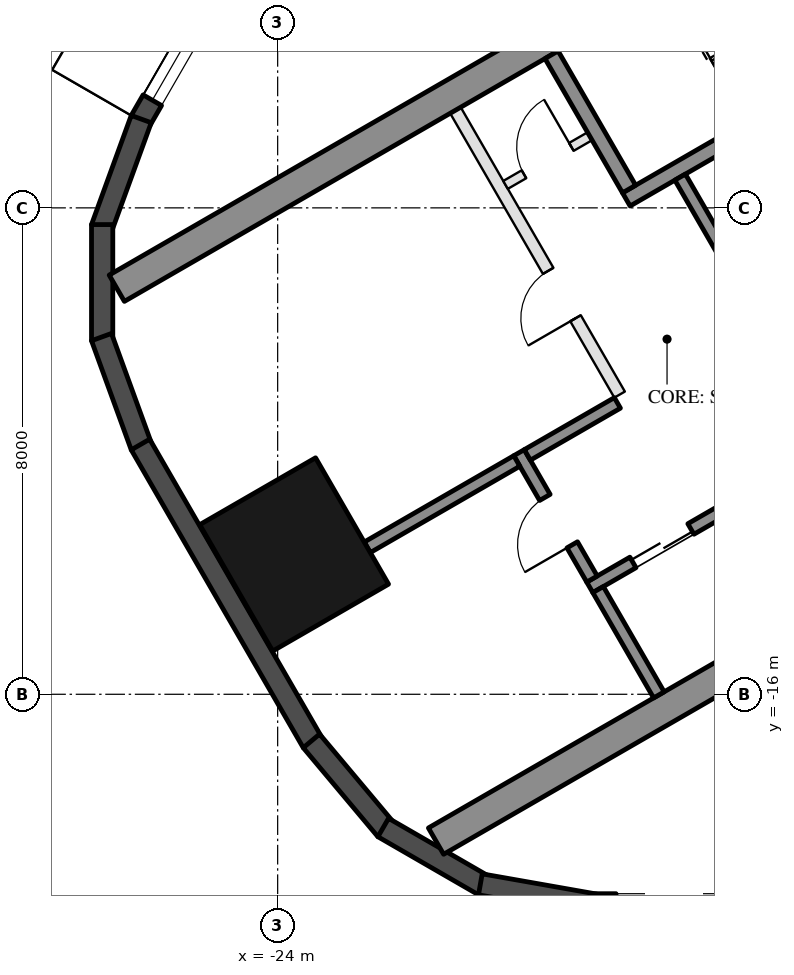
"""IFC4 building model, lengths in metres.
Left out: names, types, materials, properties, quantities, classifications, styles, units other than length and angle.
Written with IfcOpenShell. Run it as: python <this file> out.ifc"""

import sys

from ifc_helpers import new_model, si_unit, direction, frame, frame_2d, origin, origin_2d, place, context, subcontext, project, spatial, rectangle, hollow_rectangle, extrude, element, fill, save


model = new_model("IFC4")
c1 = context("Model", 3, precision=1e-05, world=origin(), true_north=direction((0.0, 1.0)))
c2 = subcontext(c1, "Body", "Model", "MODEL_VIEW")
j1 = project(units=[si_unit("LENGTHUNIT", "METRE"), si_unit("PLANEANGLEUNIT", "RADIAN")], contexts=[c1])
p1 = place(None, origin())
s1 = spatial("IfcSite", under=j1, at=p1, CompositionType="ELEMENT")
p2 = place(p1, origin())
s2 = spatial("IfcBuilding", under=s1, at=p2, CompositionType="ELEMENT")
p3 = place(p2, frame((0.0, 0.0, 228.0)))
s3 = spatial("IfcBuildingStorey", under=s2, at=p3, CompositionType="ELEMENT", Elevation=228.0)
p4 = place(p3, frame((-23.729, -13.7, 0.0), z_axis=(0.0, 0.0, 1.0), x_axis=(-0.5, 0.866025403784, 0.0)))
e1 = element("IfcColumn", 1, at=p4, inside=s3, PredefinedType="COLUMN", context=c2, shape_type="SweptSolid", body=[
    extrude(hollow_rectangle(XDim=2.4, YDim=2.2, WallThickness=0.06, at=origin_2d()), origin(), (0.0, 0.0, 1.0), 3.7),
])
p5 = place(p3, frame((-24.299, -3.176, 0.0), z_axis=(0.0, 0.0, 1.0), x_axis=(-0.500028278809, -0.866009076391, 0.0)))
e2 = element("IfcWall", 2, at=p5, inside=s3, PredefinedType="SOLIDWALL", context=c2, shape_type="SweptSolid", body=[
    extrude(rectangle(XDim=3.916, YDim=0.35, at=frame_2d((1.958, 0.0))), origin(), (0.0, 0.0, 1.0), 3.45),
])
p6 = place(p5, frame((1.625, 0.0, 0.3)))
e3 = element("IfcOpeningElement", 3, at=p6, cuts=e2, PredefinedType="OPENING", context=c2, shape_type="SweptSolid", body=[
    extrude(rectangle(XDim=1.9, YDim=2.65, at=frame_2d((0.95, 1.325))), frame((0.0, 0.185, 0.0), z_axis=(0.0, -1.0, 0.0), x_axis=(1.0, 0.0, 0.0)), (0.0, 0.0, 1.0), 0.37),
])
for number, where, z_axis, x_axis in (
    (4, (-26.244, -6.54, 0.0), (0.0, 0.0, 1.0), (-0.342, -0.94, 0.0)),
    (5, (-26.886, -8.275, 0.0), (0.0, 0.0, 1.0), (0.0, -1.0, 0.0)),
    (6, (-26.897, -10.125, 0.0), (0.0, 0.0, 1.0), (0.342, -0.94, 0.0)),
):
    element("IfcWall", number, at=place(p3, frame(where, z_axis=z_axis, x_axis=x_axis)), inside=s3, PredefinedType="SOLIDWALL", context=c2, shape_type="SweptSolid", body=[
        extrude(rectangle(XDim=1.91, YDim=0.35, at=frame_2d((0.955, 0.0))), origin(), (0.0, 0.0, 1.0), 3.45),
    ])
p7 = place(p3, frame((-26.257, -11.893, 0.0), z_axis=(0.0, 0.0, 1.0), x_axis=(0.500018773155, -0.866014564827, 0.0)))
e7 = element("IfcWall", 7, at=p7, inside=s3, PredefinedType="SOLIDWALL", context=c2, shape_type="SweptSolid", body=[
    extrude(rectangle(XDim=5.658, YDim=0.35, at=frame_2d((2.829, 0.0))), origin(), (0.0, 0.0, 1.0), 3.45),
])
for number, where, z_axis, x_axis in (
    (8, (-23.445, -16.768, 0.0), (0.0, 0.0, 1.0), (0.643, -0.766, 0.0)),
    (9, (-22.264, -18.192, 0.0), (0.0, 0.0, 1.0), (0.866, -0.5, 0.0)),
):
    element("IfcWall", number, at=place(p3, frame(where, z_axis=z_axis, x_axis=x_axis)), inside=s3, PredefinedType="SOLIDWALL", context=c2, shape_type="SweptSolid", body=[
        extrude(rectangle(XDim=1.91, YDim=0.35, at=frame_2d((0.955, 0.0))), origin(), (0.0, 0.0, 1.0), 3.45),
    ])
p8 = place(p3, frame((-20.667, -19.126, 0.0), z_axis=(0.0, 0.0, 1.0), x_axis=(0.984798995425, -0.173697837091, 0.0)))
e10 = element("IfcWall", 10, at=p8, inside=s3, PredefinedType="SOLIDWALL", context=c2, shape_type="SweptSolid", body=[
    extrude(rectangle(XDim=1.91, YDim=0.35, at=frame_2d((0.955, 0.0))), origin(), (0.0, 0.0, 1.0), 3.45),
])
p9 = place(p3, frame((-18.816, -19.455, 0.0), z_axis=(0.0, 0.0, 1.0), x_axis=(1.0, 0.0, 0.0)))
e11 = element("IfcWall", 11, at=p9, inside=s3, PredefinedType="SOLIDWALL", context=c2, shape_type="SweptSolid", body=[
    extrude(rectangle(XDim=11.816, YDim=0.35, at=frame_2d((5.908, 0.0))), origin(), (0.0, 0.0, 1.0), 3.45),
])
p10 = place(p9, frame((0.381, 0.0, 0.3)))
e12 = element("IfcOpeningElement", 12, at=p10, cuts=e11, PredefinedType="OPENING", context=c2, shape_type="SweptSolid", body=[
    extrude(rectangle(XDim=1.9, YDim=2.65, at=frame_2d((0.95, 1.325))), frame((0.0, 0.185, 0.0), z_axis=(0.0, -1.0, 0.0), x_axis=(1.0, 0.0, 0.0)), (0.0, 0.0, 1.0), 0.37),
])
p11 = place(p9, frame((7.79, 0.0, 0.0)))
e13 = element("IfcOpeningElement", 13, at=p11, cuts=e11, PredefinedType="OPENING", context=c2, shape_type="SweptSolid", body=[
    extrude(rectangle(XDim=2.4, YDim=2.4, at=frame_2d((1.2, 1.2))), frame((0.0, 0.185, 0.0), z_axis=(0.0, -1.0, 0.0), x_axis=(1.0, 0.0, 0.0)), (0.0, 0.0, 1.0), 0.37),
])
p12 = place(p9, frame((3.741, 0.0, 0.3)))
e14 = element("IfcOpeningElement", 14, at=p12, cuts=e11, PredefinedType="OPENING", context=c2, shape_type="SweptSolid", body=[
    extrude(rectangle(XDim=1.7, YDim=2.65, at=frame_2d((0.85, 1.325))), frame((0.0, 0.185, 0.0), z_axis=(0.0, -1.0, 0.0), x_axis=(1.0, 0.0, 0.0)), (0.0, 0.0, 1.0), 0.37),
])
p13 = place(p9, frame((5.741, 0.0, 0.3)))
e15 = element("IfcOpeningElement", 15, at=p13, cuts=e11, PredefinedType="OPENING", context=c2, shape_type="SweptSolid", body=[
    extrude(rectangle(XDim=1.7, YDim=2.65, at=frame_2d((0.85, 1.325))), frame((0.0, 0.185, 0.0), z_axis=(0.0, -1.0, 0.0), x_axis=(1.0, 0.0, 0.0)), (0.0, 0.0, 1.0), 0.37),
])
for number, where, z_axis, x_axis in (
    (16, (-13.797, -1.903, 0.0), (0.0, 0.0, 1.0), (-0.866, -0.5, 0.0)),
    (17, (-8.547, -10.997, 0.0), (0.0, 0.0, 1.0), (-0.866, -0.5, 0.0)),
):
    element("IfcWall", number, at=place(p3, frame(where, z_axis=z_axis, x_axis=x_axis)), inside=s3, PredefinedType="SHEAR", context=c2, shape_type="SweptSolid", body=[
        extrude(rectangle(XDim=14.837, YDim=0.5, at=frame_2d((7.418, 0.0))), origin(), (0.0, 0.0, 1.0), 3.45),
    ])
p14 = place(p3, frame((-12.681, -4.636, 0.0), z_axis=(0.0, 0.0, 1.0), x_axis=(-0.866021702275, -0.500006411147, 0.0)))
e18 = element("IfcWall", 18, at=p14, inside=s3, PredefinedType="SHEAR", context=c2, shape_type="SweptSolid", body=[
    extrude(rectangle(XDim=6.45, YDim=0.25, at=frame_2d((3.225, 0.0))), origin(), (0.0, 0.0, 1.0), 3.45),
])
p15 = place(p14, frame((0.3, 0.0, 0.0)))
e19 = element("IfcOpeningElement", 19, at=p15, cuts=e18, PredefinedType="OPENING", context=c2, shape_type="SweptSolid", body=[
    extrude(rectangle(XDim=1.0, YDim=2.1, at=frame_2d((0.5, 1.05))), frame((0.0, 0.135, 0.0), z_axis=(0.0, -1.0, 0.0), x_axis=(1.0, 0.0, 0.0)), (0.0, 0.0, 1.0), 0.27),
])
p16 = place(p3, frame((-19.496, -5.482, 0.0), z_axis=(0.0, 0.0, 1.0), x_axis=(0.499990435942, -0.866030925526, 0.0)))
e20 = element("IfcWall", 20, at=p16, inside=s3, PredefinedType="SHEAR", context=c2, shape_type="SweptSolid", body=[
    extrude(rectangle(XDim=2.55, YDim=0.25, at=frame_2d((1.275, 0.0))), origin(), (0.0, 0.0, 1.0), 3.45),
])
p17 = place(p3, frame((-17.381, -7.495, 0.0), z_axis=(0.0, 0.0, 1.0), x_axis=(0.500011755427, -0.866018616679, 0.0)))
e21 = element("IfcWall", 21, at=p17, inside=s3, PredefinedType="SHEAR", context=c2, shape_type="SweptSolid", body=[
    extrude(rectangle(XDim=2.8, YDim=0.2, at=frame_2d((1.4, 0.0))), origin(), (0.0, 0.0, 1.0), 3.45),
])
p18 = place(p3, frame((-10.068, -9.162, 0.0), z_axis=(0.0, 0.0, 1.0), x_axis=(-0.866032725843, -0.499987317609, 0.0)))
e22 = element("IfcWall", 22, at=p18, inside=s3, PredefinedType="SHEAR", context=c2, shape_type="SweptSolid", body=[
    extrude(rectangle(XDim=10.16, YDim=0.2, at=frame_2d((5.08, 0.0))), origin(), (0.0, 0.0, 1.0), 3.45),
])
p19 = place(p18, frame((0.62, 0.0, 0.0)))
e23 = element("IfcOpeningElement", 23, at=p19, cuts=e22, PredefinedType="OPENING", context=c2, shape_type="SweptSolid", body=[
    extrude(rectangle(XDim=1.1, YDim=2.1, at=frame_2d((0.55, 1.05))), frame((0.0, 0.11, 0.0), z_axis=(0.0, -1.0, 0.0), x_axis=(1.0, 0.0, 0.0)), (0.0, 0.0, 1.0), 0.22),
])
p20 = place(p18, frame((3.16, 0.0, 0.0)))
e24 = element("IfcOpeningElement", 24, at=p20, cuts=e22, PredefinedType="OPENING", context=c2, shape_type="SweptSolid", body=[
    extrude(rectangle(XDim=1.1, YDim=2.1, at=frame_2d((0.55, 1.05))), frame((0.0, 0.11, 0.0), z_axis=(0.0, -1.0, 0.0), x_axis=(1.0, 0.0, 0.0)), (0.0, 0.0, 1.0), 0.22),
])
p21 = place(p18, frame((5.7, 0.0, 0.0)))
e25 = element("IfcOpeningElement", 25, at=p21, cuts=e22, PredefinedType="OPENING", context=c2, shape_type="SweptSolid", body=[
    extrude(rectangle(XDim=1.1, YDim=2.1, at=frame_2d((0.55, 1.05))), frame((0.0, 0.11, 0.0), z_axis=(0.0, -1.0, 0.0), x_axis=(1.0, 0.0, 0.0)), (0.0, 0.0, 1.0), 0.22),
])
p22 = place(p18, frame((8.24, 0.0, 0.0)))
e26 = element("IfcOpeningElement", 26, at=p22, cuts=e22, PredefinedType="OPENING", context=c2, shape_type="SweptSolid", body=[
    extrude(rectangle(XDim=1.1, YDim=2.1, at=frame_2d((0.55, 1.05))), frame((0.0, 0.11, 0.0), z_axis=(0.0, -1.0, 0.0), x_axis=(1.0, 0.0, 0.0)), (0.0, 0.0, 1.0), 0.22),
])
p23 = place(p3, frame((-20.031, -12.026, 0.0), z_axis=(0.0, 0.0, 1.0), x_axis=(0.500033551112, -0.866006032174, 0.0)))
e27 = element("IfcWall", 27, at=p23, inside=s3, PredefinedType="SHEAR", context=c2, shape_type="SweptSolid", body=[
    extrude(rectangle(XDim=2.4, YDim=0.2, at=frame_2d((1.2, 0.0))), origin(), (0.0, 0.0, 1.0), 3.45),
])
p24 = place(p23, frame((0.85, 0.0, 0.0)))
e28 = element("IfcOpeningElement", 28, at=p24, cuts=e27, PredefinedType="OPENING", context=c2, shape_type="SweptSolid", body=[
    extrude(rectangle(XDim=0.9, YDim=2.1, at=frame_2d((0.45, 1.05))), frame((0.0, 0.11, 0.0), z_axis=(0.0, -1.0, 0.0), x_axis=(1.0, 0.0, 0.0)), (0.0, 0.0, 1.0), 0.22),
])
p25 = place(p3, frame((-18.413, -11.208, 0.0), z_axis=(0.0, 0.0, 1.0), x_axis=(-0.866038183914, -0.499977863513, 0.0)))
e29 = element("IfcWall", 29, at=p25, inside=s3, PredefinedType="SHEAR", context=c2, shape_type="SweptSolid", body=[
    extrude(rectangle(XDim=1.71, YDim=0.2, at=frame_2d((0.855, 0.0))), origin(), (0.0, 0.0, 1.0), 3.45),
])
p26 = place(p3, frame((-18.73, -14.278, 0.0), z_axis=(0.0, 0.0, 1.0), x_axis=(0.50002537861, -0.866010750942, 0.0)))
e30 = element("IfcWall", 30, at=p26, inside=s3, PredefinedType="SHEAR", context=c2, shape_type="SweptSolid", body=[
    extrude(rectangle(XDim=2.0, YDim=0.2, at=frame_2d((1.0, 0.0))), origin(), (0.0, 0.0, 1.0), 3.45),
])
p27 = place(p3, frame((-20.067, -12.163, 0.0), z_axis=(0.0, 0.0, 1.0), x_axis=(-0.866055327414, -0.49994816717, 0.0)))
e31 = element("IfcWall", 31, at=p27, inside=s3, PredefinedType="SHEAR", context=c2, shape_type="SweptSolid", body=[
    extrude(rectangle(XDim=2.84, YDim=0.2, at=frame_2d((1.42, 0.0))), origin(), (0.0, 0.0, 1.0), 3.45),
])
p28 = place(p3, frame((-21.076, -6.395, 0.0), z_axis=(0.0, 0.0, 1.0), x_axis=(0.50001468107, -0.866016927499, 0.0)))
e32 = element("IfcWall", 32, at=p28, inside=s3, PredefinedType="PARTITIONING", context=c2, shape_type="SweptSolid", body=[
    extrude(rectangle(XDim=5.4, YDim=0.2, at=frame_2d((2.7, 0.0))), origin(), (0.0, 0.0, 1.0), 3.45),
])
p29 = place(p28, frame((3.05, 0.0, 0.0)))
e33 = element("IfcOpeningElement", 33, at=p29, cuts=e32, PredefinedType="OPENING", context=c2, shape_type="SweptSolid", body=[
    extrude(rectangle(XDim=0.9, YDim=2.1, at=frame_2d((0.45, 1.05))), frame((0.0, 0.11, 0.0), z_axis=(0.0, -1.0, 0.0), x_axis=(1.0, 0.0, 0.0)), (0.0, 0.0, 1.0), 0.22),
])
p30 = place(p3, frame((-18.866, -6.822, 0.0), z_axis=(0.0, 0.0, 1.0), x_axis=(-0.866028054938, -0.499995408039, 0.0)))
e34 = element("IfcWall", 34, at=p30, inside=s3, PredefinedType="PARTITIONING", context=c2, shape_type="SweptSolid", body=[
    extrude(rectangle(XDim=1.6, YDim=0.15, at=frame_2d((0.8, 0.0))), origin(), (0.0, 0.0, 1.0), 3.45),
])
p31 = place(p30, frame((0.35, 0.0, 0.0)))
e35 = element("IfcOpeningElement", 35, at=p31, cuts=e34, PredefinedType="OPENING", context=c2, shape_type="SweptSolid", body=[
    extrude(rectangle(XDim=0.9, YDim=2.1, at=frame_2d((0.45, 1.05))), frame((0.0, 0.085, 0.0), z_axis=(0.0, -1.0, 0.0), x_axis=(1.0, 0.0, 0.0)), (0.0, 0.0, 1.0), 0.17),
])
p32 = place(p6, origin())
e36 = element("IfcWindow", 36, at=p32, inside=s3, PartitioningType="SINGLE_PANEL", PredefinedType="WINDOW", context=c2, shape_type="SweptSolid", body=[
    extrude(rectangle(XDim=1.9, YDim=2.65, at=frame_2d((0.95, 1.325))), frame((0.0, 0.03, 0.0), z_axis=(0.0, -1.0, 0.0), x_axis=(1.0, 0.0, 0.0)), (0.0, 0.0, 1.0), 0.06),
])
fill(e3, e36)
p33 = place(p31, frame((0.9, 0.0, 0.0), z_axis=(0.0, 0.0, 1.0), x_axis=(-1.0, 0.0, 0.0)))
e37 = element("IfcDoor", 37, at=p33, inside=s3, OperationType="SINGLE_SWING_RIGHT", PredefinedType="DOOR", context=c2, shape_type="SweptSolid", body=[
    extrude(rectangle(XDim=0.9, YDim=2.1, at=frame_2d((0.45, 1.05))), frame((0.0, 0.025, 0.0), z_axis=(0.0, -1.0, 0.0), x_axis=(1.0, 0.0, 0.0)), (0.0, 0.0, 1.0), 0.05),
])
fill(e35, e37)
p34 = place(p22, origin())
e38 = element("IfcDoor", 38, at=p34, inside=s3, OperationType="DOUBLE_DOOR_SLIDING", PredefinedType="DOOR", context=c2, shape_type="SweptSolid", body=[
    extrude(rectangle(XDim=1.1, YDim=2.1, at=frame_2d((0.55, 1.05))), frame((0.0, 0.025, 0.0), z_axis=(0.0, -1.0, 0.0), x_axis=(1.0, 0.0, 0.0)), (0.0, 0.0, 1.0), 0.05),
])
fill(e26, e38)
p35 = place(p24, frame((0.9, 0.0, 0.0), z_axis=(0.0, 0.0, 1.0), x_axis=(-1.0, 0.0, 0.0)))
e39 = element("IfcDoor", 39, at=p35, inside=s3, OperationType="SINGLE_SWING_LEFT", PredefinedType="DOOR", context=c2, shape_type="SweptSolid", body=[
    extrude(rectangle(XDim=0.9, YDim=2.1, at=frame_2d((0.45, 1.05))), frame((0.0, 0.025, 0.0), z_axis=(0.0, -1.0, 0.0), x_axis=(1.0, 0.0, 0.0)), (0.0, 0.0, 1.0), 0.05),
])
fill(e28, e39)
p36 = place(p29, frame((0.9, 0.0, 0.0), z_axis=(0.0, 0.0, 1.0), x_axis=(-1.0, 0.0, 0.0)))
e40 = element("IfcDoor", 40, at=p36, inside=s3, OperationType="SINGLE_SWING_LEFT", PredefinedType="DOOR", context=c2, shape_type="SweptSolid", body=[
    extrude(rectangle(XDim=0.9, YDim=2.1, at=frame_2d((0.45, 1.05))), frame((0.0, 0.025, 0.0), z_axis=(0.0, -1.0, 0.0), x_axis=(1.0, 0.0, 0.0)), (0.0, 0.0, 1.0), 0.05),
])
fill(e33, e40)
save(model, sys.argv[1])
